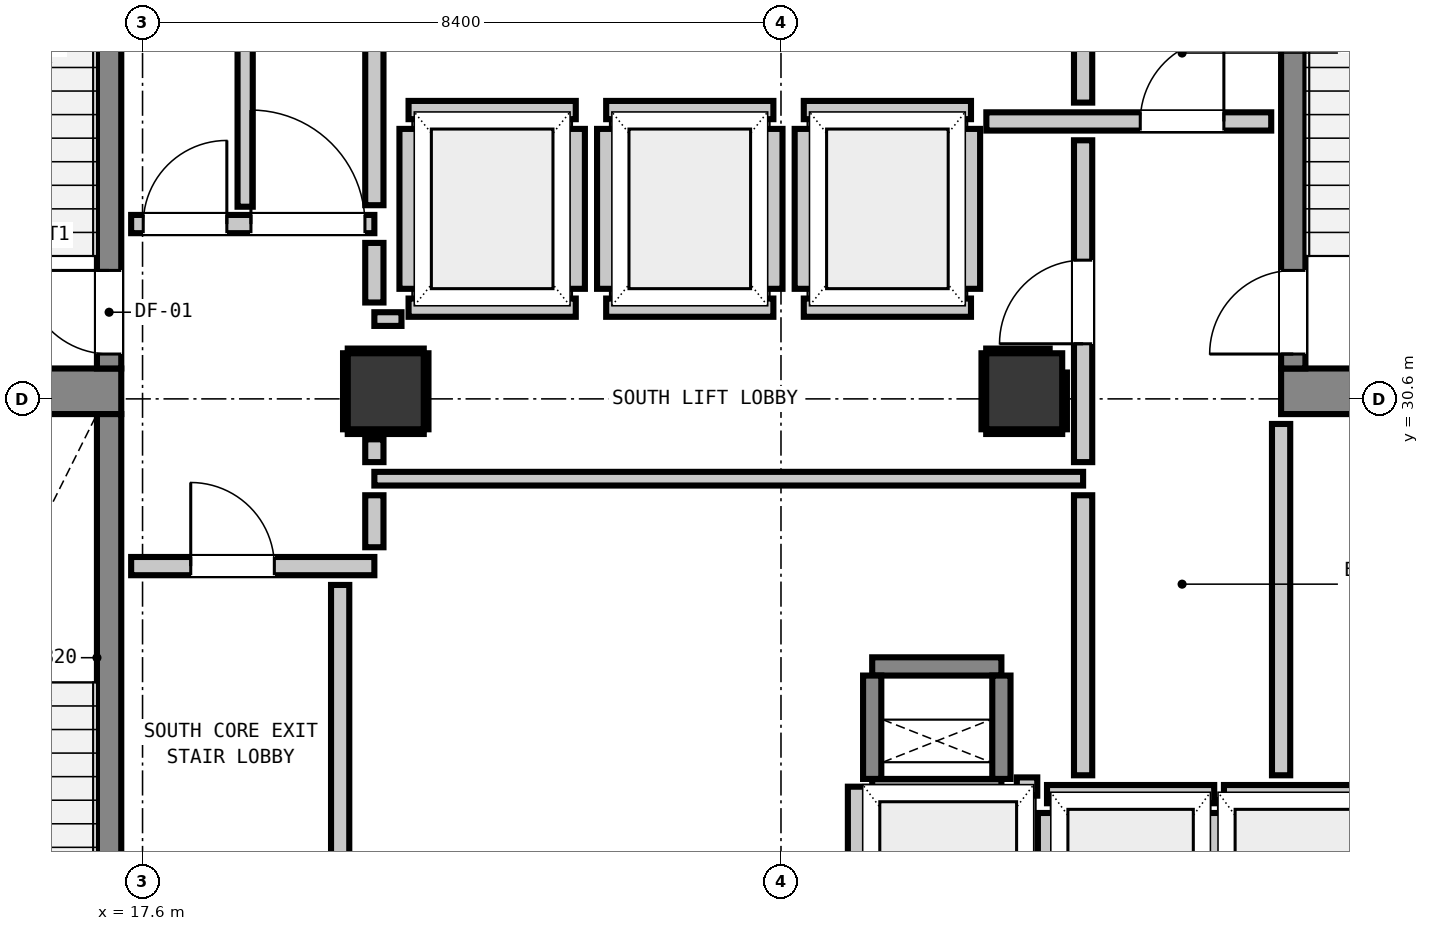
"""IFC4 building model, lengths in metres.
Left out: names, types, materials, properties, quantities, classifications, styles, units other than length and angle.
Written with IfcOpenShell. Run it as: python <this file> out.ifc"""

import sys

from ifc_helpers import new_model, si_unit, direction, frame, frame_2d, origin, origin_2d, place, context, subcontext, project, spatial, rectangle, extrude, element, fill, save


model = new_model("IFC4")
c1 = context("Model", 3, precision=1e-05, world=origin(), true_north=direction((0.0, 1.0)))
c2 = subcontext(c1, "Body", "Model", "MODEL_VIEW")
j1 = project(units=[si_unit("LENGTHUNIT", "METRE"), si_unit("PLANEANGLEUNIT", "RADIAN")], contexts=[c1])
p1 = place(None, origin())
s1 = spatial("IfcSite", under=j1, at=p1, CompositionType="ELEMENT")
p2 = place(p1, origin())
s2 = spatial("IfcBuilding", under=s1, at=p2, CompositionType="ELEMENT")
p3 = place(p2, frame((0.0, 0.0, 119.36)))
s3 = spatial("IfcBuildingStorey", under=s2, at=p3, CompositionType="ELEMENT", Elevation=119.36)
for number, where, z_axis, x_axis in (
    (1, (13.905, 30.7, 0.0), (0.0, 0.0, 1.0), (1.0, 0.0, 0.0)),
    (2, (32.58, 30.7, 0.0), (0.0, 0.0, 1.0), (1.0, 0.0, 0.0)),
):
    element("IfcWall", number, at=place(p3, frame(where, z_axis=z_axis, x_axis=x_axis)), inside=s3, PredefinedType="SHEAR", context=c2, shape_type="SweptSolid", body=[
        extrude(rectangle(XDim=3.415, YDim=0.6, at=frame_2d((1.708, 0.0))), origin(), (0.0, 0.0, 1.0), 3.32),
    ])
p4 = place(p3, frame((17.16, 31.0, 0.0), z_axis=(0.0, 0.0, 1.0), x_axis=(0.0, 1.0, 0.0)))
e3 = element("IfcWall", 3, at=p4, inside=s3, PredefinedType="SHEAR", context=c2, shape_type="SweptSolid", body=[
    extrude(rectangle(XDim=7.8, YDim=0.32, at=frame_2d((3.9, 0.0))), origin(), (0.0, 0.0, 1.0), 3.32),
])
p5 = place(p4, frame((0.19, 0.0, 0.0)))
e4 = element("IfcOpeningElement", 4, at=p5, cuts=e3, PredefinedType="OPENING", context=c2, shape_type="SweptSolid", body=[
    extrude(rectangle(XDim=1.1, YDim=2.15, at=frame_2d((0.55, 1.075))), frame((0.0, 0.17, 0.0), z_axis=(0.0, -1.0, 0.0), x_axis=(1.0, 0.0, 0.0)), (0.0, 0.0, 1.0), 0.34),
])
p6 = place(p3, frame((17.16, 22.5, 0.0), z_axis=(0.0, 0.0, 1.0), x_axis=(0.0, 1.0, 0.0)))
e5 = element("IfcWall", 5, at=p6, inside=s3, PredefinedType="SHEAR", context=c2, shape_type="SweptSolid", body=[
    extrude(rectangle(XDim=7.9, YDim=0.32, at=frame_2d((3.95, 0.0))), origin(), (0.0, 0.0, 1.0), 3.32),
])
p7 = place(p6, frame((0.29, 0.0, 0.0)))
e6 = element("IfcOpeningElement", 6, at=p7, cuts=e5, PredefinedType="OPENING", context=c2, shape_type="SweptSolid", body=[
    extrude(rectangle(XDim=1.1, YDim=2.15, at=frame_2d((0.55, 1.075))), frame((0.0, 0.17, 0.0), z_axis=(0.0, -1.0, 0.0), x_axis=(1.0, 0.0, 0.0)), (0.0, 0.0, 1.0), 0.34),
])
p8 = place(p3, frame((32.74, 31.0, 0.0), z_axis=(0.0, 0.0, 1.0), x_axis=(0.0, 1.0, 0.0)))
e7 = element("IfcWall", 7, at=p8, inside=s3, PredefinedType="SHEAR", context=c2, shape_type="SweptSolid", body=[
    extrude(rectangle(XDim=7.8, YDim=0.32, at=frame_2d((3.9, 0.0))), origin(), (0.0, 0.0, 1.0), 3.32),
])
p9 = place(p8, frame((0.19, 0.0, 0.0)))
e8 = element("IfcOpeningElement", 8, at=p9, cuts=e7, PredefinedType="OPENING", context=c2, shape_type="SweptSolid", body=[
    extrude(rectangle(XDim=1.1, YDim=2.15, at=frame_2d((0.55, 1.075))), frame((0.0, 0.17, 0.0), z_axis=(0.0, -1.0, 0.0), x_axis=(1.0, 0.0, 0.0)), (0.0, 0.0, 1.0), 0.34),
])
for number, where, z_axis, x_axis in (
    (9, (27.2, 25.48, 0.0), (0.0, 0.0, 1.0), (1.0, 0.0, 0.0)),
    (10, (27.2, 27.08, 0.0), (0.0, 0.0, 1.0), (1.0, 0.0, 0.0)),
):
    element("IfcWall", number, at=place(p3, frame(where, z_axis=z_axis, x_axis=x_axis)), inside=s3, PredefinedType="SHEAR", context=c2, shape_type="SweptSolid", body=[
        extrude(rectangle(XDim=1.7, YDim=0.24, at=frame_2d((0.85, 0.0))), origin(), (0.0, 0.0, 1.0), 3.32),
    ])
for number, where, z_axis, x_axis in (
    (11, (27.2, 25.6, 0.0), (0.0, 0.0, 1.0), (0.0, 1.0, 0.0)),
    (12, (28.9, 25.6, 0.0), (0.0, 0.0, 1.0), (0.0, 1.0, 0.0)),
):
    element("IfcWall", number, at=place(p3, frame(where, z_axis=z_axis, x_axis=x_axis)), inside=s3, PredefinedType="SHEAR", context=c2, shape_type="SweptSolid", body=[
        extrude(rectangle(XDim=1.36, YDim=0.24, at=frame_2d((0.68, 0.0))), origin(), (0.0, 0.0, 1.0), 3.32),
    ])
for number, where, z_axis, x_axis in (
    (13, (20.8, 30.7, 0.0), (0.0, 0.0, 1.0), (1.0, 0.0, 0.0)),
    (14, (29.2, 30.7, 0.0), (0.0, 0.0, 1.0), (1.0, 0.0, 0.0)),
):
    element("IfcColumn", number, at=place(p3, frame(where, z_axis=z_axis, x_axis=x_axis)), inside=s3, PredefinedType="COLUMN", context=c2, shape_type="SweptSolid", body=[
        extrude(rectangle(XDim=1.0, YDim=1.0, at=origin_2d()), origin(), (0.0, 0.0, 1.0), 3.32),
    ])
for number, where, z_axis, x_axis in (
    (15, (21.1, 31.8, 0.0), (0.0, 0.0, 1.0), (1.0, 0.0, 0.0)),
    (16, (21.1, 34.4, 0.0), (0.0, 0.0, 1.0), (1.0, 0.0, 0.0)),
):
    element("IfcWall", number, at=place(p3, frame(where, z_axis=z_axis, x_axis=x_axis)), inside=s3, PredefinedType="PARTITIONING", context=c2, shape_type="SweptSolid", body=[
        extrude(rectangle(XDim=2.2, YDim=0.24, at=frame_2d((1.1, 0.0))), origin(), (0.0, 0.0, 1.0), 3.08),
    ])
p10 = place(p3, frame((21.1, 32.048, 0.0), z_axis=(0.0, 0.0, 1.0), x_axis=(0.0, 1.0, 0.0)))
e17 = element("IfcWall", 17, at=p10, inside=s3, PredefinedType="PARTITIONING", context=c2, shape_type="SweptSolid", body=[
    extrude(rectangle(XDim=2.104, YDim=0.24, at=frame_2d((1.052, 0.0))), origin(), (0.0, 0.0, 1.0), 2.315),
])
p11 = place(p3, frame((23.3, 32.048, 0.0), z_axis=(0.0, 0.0, 1.0), x_axis=(0.0, 1.0, 0.0)))
e18 = element("IfcWall", 18, at=p11, inside=s3, PredefinedType="PARTITIONING", context=c2, shape_type="SweptSolid", body=[
    extrude(rectangle(XDim=2.104, YDim=0.24, at=frame_2d((1.052, 0.0))), origin(), (0.0, 0.0, 1.0), 3.08),
])
for number, where, z_axis, x_axis in (
    (19, (23.7, 31.8, 0.0), (0.0, 0.0, 1.0), (1.0, 0.0, 0.0)),
    (20, (23.7, 34.4, 0.0), (0.0, 0.0, 1.0), (1.0, 0.0, 0.0)),
):
    element("IfcWall", number, at=place(p3, frame(where, z_axis=z_axis, x_axis=x_axis)), inside=s3, PredefinedType="PARTITIONING", context=c2, shape_type="SweptSolid", body=[
        extrude(rectangle(XDim=2.2, YDim=0.24, at=frame_2d((1.1, 0.0))), origin(), (0.0, 0.0, 1.0), 3.08),
    ])
for number, where, z_axis, x_axis in (
    (21, (23.7, 32.048, 0.0), (0.0, 0.0, 1.0), (0.0, 1.0, 0.0)),
    (22, (25.9, 32.048, 0.0), (0.0, 0.0, 1.0), (0.0, 1.0, 0.0)),
):
    element("IfcWall", number, at=place(p3, frame(where, z_axis=z_axis, x_axis=x_axis)), inside=s3, PredefinedType="PARTITIONING", context=c2, shape_type="SweptSolid", body=[
        extrude(rectangle(XDim=2.104, YDim=0.24, at=frame_2d((1.052, 0.0))), origin(), (0.0, 0.0, 1.0), 3.08),
    ])
for number, where, z_axis, x_axis in (
    (23, (26.3, 31.8, 0.0), (0.0, 0.0, 1.0), (1.0, 0.0, 0.0)),
    (24, (26.3, 34.4, 0.0), (0.0, 0.0, 1.0), (1.0, 0.0, 0.0)),
):
    element("IfcWall", number, at=place(p3, frame(where, z_axis=z_axis, x_axis=x_axis)), inside=s3, PredefinedType="PARTITIONING", context=c2, shape_type="SweptSolid", body=[
        extrude(rectangle(XDim=2.2, YDim=0.24, at=frame_2d((1.1, 0.0))), origin(), (0.0, 0.0, 1.0), 3.08),
    ])
for number, where, z_axis, x_axis in (
    (25, (26.3, 32.048, 0.0), (0.0, 0.0, 1.0), (0.0, 1.0, 0.0)),
    (26, (28.5, 32.048, 0.0), (0.0, 0.0, 1.0), (0.0, 1.0, 0.0)),
):
    element("IfcWall", number, at=place(p3, frame(where, z_axis=z_axis, x_axis=x_axis)), inside=s3, PredefinedType="PARTITIONING", context=c2, shape_type="SweptSolid", body=[
        extrude(rectangle(XDim=2.104, YDim=0.24, at=frame_2d((1.052, 0.0))), origin(), (0.0, 0.0, 1.0), 3.08),
    ])
p12 = place(p3, frame((29.5, 25.4, 0.0), z_axis=(0.0, 0.0, 1.0), x_axis=(1.0, 0.0, 0.0)))
e27 = element("IfcWall", 27, at=p12, inside=s3, PredefinedType="PARTITIONING", context=c2, shape_type="SweptSolid", body=[
    extrude(rectangle(XDim=2.2, YDim=0.24, at=frame_2d((1.1, 0.0))), origin(), (0.0, 0.0, 1.0), 3.08),
])
p13 = place(p3, frame((29.5, 22.632, 0.0), z_axis=(0.0, 0.0, 1.0), x_axis=(0.0, 1.0, 0.0)))
e28 = element("IfcWall", 28, at=p13, inside=s3, PredefinedType="PARTITIONING", context=c2, shape_type="SweptSolid", body=[
    extrude(rectangle(XDim=2.52, YDim=0.24, at=frame_2d((1.26, 0.0))), origin(), (0.0, 0.0, 1.0), 2.315),
])
p14 = place(p3, frame((31.7, 22.63, 0.0), z_axis=(0.0, 0.0, 1.0), x_axis=(0.0, 1.0, 0.0)))
e29 = element("IfcWall", 29, at=p14, inside=s3, PredefinedType="PARTITIONING", context=c2, shape_type="SweptSolid", body=[
    extrude(rectangle(XDim=2.522, YDim=0.24, at=frame_2d((1.261, 0.0))), origin(), (0.0, 0.0, 1.0), 3.08),
])
p15 = place(p3, frame((31.828, 25.4, 0.0), z_axis=(0.0, 0.0, 1.0), x_axis=(1.0, 0.0, 0.0)))
e30 = element("IfcWall", 30, at=p15, inside=s3, PredefinedType="PARTITIONING", context=c2, shape_type="SweptSolid", body=[
    extrude(rectangle(XDim=2.072, YDim=0.24, at=frame_2d((1.036, 0.0))), origin(), (0.0, 0.0, 1.0), 3.08),
])
p16 = place(p3, frame((29.103, 25.5, 0.0), z_axis=(0.0, 0.0, 1.0), x_axis=(1.0, 0.0, 0.0)))
e31 = element("IfcWall", 31, at=p16, inside=s3, PredefinedType="PARTITIONING", context=c2, shape_type="SweptSolid", body=[
    extrude(rectangle(XDim=0.269, YDim=0.24, at=frame_2d((0.135, 0.0))), origin(), (0.0, 0.0, 1.0), 3.08),
])
p17 = place(p3, frame((27.0, 22.63, 0.0), z_axis=(0.0, 0.0, 1.0), x_axis=(0.0, 1.0, 0.0)))
e32 = element("IfcWall", 32, at=p17, inside=s3, PredefinedType="PARTITIONING", context=c2, shape_type="SweptSolid", body=[
    extrude(rectangle(XDim=2.868, YDim=0.24, at=frame_2d((1.434, 0.0))), origin(), (0.0, 0.0, 1.0), 3.08),
])
p18 = place(p3, frame((17.45, 28.4, 0.0), z_axis=(0.0, 0.0, 1.0), x_axis=(1.0, 0.0, 0.0)))
e33 = element("IfcWall", 33, at=p18, inside=s3, PredefinedType="PARTITIONING", context=c2, shape_type="SweptSolid", body=[
    extrude(rectangle(XDim=3.2, YDim=0.24, at=frame_2d((1.6, 0.0))), origin(), (0.0, 0.0, 1.0), 3.08),
])
p19 = place(p18, frame((0.784, 0.0, 0.0)))
e34 = element("IfcOpeningElement", 34, at=p19, cuts=e33, PredefinedType="OPENING", context=c2, shape_type="SweptSolid", body=[
    extrude(rectangle(XDim=1.1, YDim=2.15, at=frame_2d((0.55, 1.075))), frame((0.0, 0.13, 0.0), z_axis=(0.0, -1.0, 0.0), x_axis=(1.0, 0.0, 0.0)), (0.0, 0.0, 1.0), 0.26),
])
p20 = place(p3, frame((17.45, 32.9, 0.0), z_axis=(0.0, 0.0, 1.0), x_axis=(1.0, 0.0, 0.0)))
e35 = element("IfcWall", 35, at=p20, inside=s3, PredefinedType="PARTITIONING", context=c2, shape_type="SweptSolid", body=[
    extrude(rectangle(XDim=3.2, YDim=0.24, at=frame_2d((1.6, 0.0))), origin(), (0.0, 0.0, 1.0), 3.08),
])
p21 = place(p20, frame((0.159, 0.0, 0.0)))
e36 = element("IfcOpeningElement", 36, at=p21, cuts=e35, PredefinedType="OPENING", context=c2, shape_type="SweptSolid", body=[
    extrude(rectangle(XDim=1.1, YDim=2.15, at=frame_2d((0.55, 1.075))), frame((0.0, 0.13, 0.0), z_axis=(0.0, -1.0, 0.0), x_axis=(1.0, 0.0, 0.0)), (0.0, 0.0, 1.0), 0.26),
])
p22 = place(p20, frame((1.576, 0.0, 0.0)))
e37 = element("IfcOpeningElement", 37, at=p22, cuts=e35, PredefinedType="OPENING", context=c2, shape_type="SweptSolid", body=[
    extrude(rectangle(XDim=1.5, YDim=2.15, at=frame_2d((0.75, 1.075))), frame((0.0, 0.13, 0.0), z_axis=(0.0, -1.0, 0.0), x_axis=(1.0, 0.0, 0.0)), (0.0, 0.0, 1.0), 0.26),
])
p23 = place(p3, frame((28.702, 34.25, 0.0), z_axis=(0.0, 0.0, 1.0), x_axis=(1.0, 0.0, 0.0)))
e38 = element("IfcWall", 38, at=p23, inside=s3, PredefinedType="PARTITIONING", context=c2, shape_type="SweptSolid", body=[
    extrude(rectangle(XDim=3.748, YDim=0.24, at=frame_2d((1.874, 0.0))), origin(), (0.0, 0.0, 1.0), 3.08),
])
p24 = place(p23, frame((2.025, 0.0, 0.0)))
e39 = element("IfcOpeningElement", 39, at=p24, cuts=e38, PredefinedType="OPENING", context=c2, shape_type="SweptSolid", body=[
    extrude(rectangle(XDim=1.1, YDim=2.15, at=frame_2d((0.55, 1.075))), frame((0.0, 0.13, 0.0), z_axis=(0.0, -1.0, 0.0), x_axis=(1.0, 0.0, 0.0)), (0.0, 0.0, 1.0), 0.26),
])
p25 = place(p3, frame((20.65, 29.55, 0.0), z_axis=(0.0, 0.0, 1.0), x_axis=(1.0, 0.0, 0.0)))
e40 = element("IfcWall", 40, at=p25, inside=s3, PredefinedType="PARTITIONING", context=c2, shape_type="SweptSolid", body=[
    extrude(rectangle(XDim=9.325, YDim=0.18, at=frame_2d((4.663, 0.0))), origin(), (0.0, 0.0, 1.0), 3.08),
])
p26 = place(p3, frame((20.65, 31.65, 0.0), z_axis=(0.0, 0.0, 1.0), x_axis=(1.0, 0.0, 0.0)))
e41 = element("IfcWall", 41, at=p26, inside=s3, PredefinedType="PARTITIONING", context=c2, shape_type="SweptSolid", body=[
    extrude(rectangle(XDim=0.357, YDim=0.18, at=frame_2d((0.179, 0.0))), origin(), (0.0, 0.0, 1.0), 3.08),
])
p27 = place(p3, frame((20.2, 22.586, 0.0), z_axis=(0.0, 0.0, 1.0), x_axis=(0.0, 1.0, 0.0)))
e42 = element("IfcWall", 42, at=p27, inside=s3, PredefinedType="PARTITIONING", context=c2, shape_type="SweptSolid", body=[
    extrude(rectangle(XDim=5.566, YDim=0.24, at=frame_2d((2.783, 0.0))), origin(), (0.0, 0.0, 1.0), 3.08),
])
p28 = place(p3, frame((20.65, 28.648, 0.0), z_axis=(0.0, 0.0, 1.0), x_axis=(0.0, 1.0, 0.0)))
e43 = element("IfcWall", 43, at=p28, inside=s3, PredefinedType="PARTITIONING", context=c2, shape_type="SweptSolid", body=[
    extrude(rectangle(XDim=0.684, YDim=0.24, at=frame_2d((0.342, 0.0))), origin(), (0.0, 0.0, 1.0), 2.315),
])
p29 = place(p3, frame((20.65, 29.768, 0.0), z_axis=(0.0, 0.0, 1.0), x_axis=(0.0, 1.0, 0.0)))
e44 = element("IfcWall", 44, at=p29, inside=s3, PredefinedType="PARTITIONING", context=c2, shape_type="SweptSolid", body=[
    extrude(rectangle(XDim=0.3, YDim=0.24, at=frame_2d((0.15, 0.0))), origin(), (0.0, 0.0, 1.0), 2.315),
])
p30 = place(p3, frame((20.65, 31.868, 0.0), z_axis=(0.0, 0.0, 1.0), x_axis=(0.0, 1.0, 0.0)))
e45 = element("IfcWall", 45, at=p30, inside=s3, PredefinedType="PARTITIONING", context=c2, shape_type="SweptSolid", body=[
    extrude(rectangle(XDim=0.784, YDim=0.24, at=frame_2d((0.392, 0.0))), origin(), (0.0, 0.0, 1.0), 2.315),
])
p31 = place(p3, frame((20.65, 33.148, 0.0), z_axis=(0.0, 0.0, 1.0), x_axis=(0.0, 1.0, 0.0)))
e46 = element("IfcWall", 46, at=p31, inside=s3, PredefinedType="PARTITIONING", context=c2, shape_type="SweptSolid", body=[
    extrude(rectangle(XDim=2.274, YDim=0.24, at=frame_2d((1.137, 0.0))), origin(), (0.0, 0.0, 1.0), 2.315),
])
p32 = place(p3, frame((29.975, 25.648, 0.0), z_axis=(0.0, 0.0, 1.0), x_axis=(0.0, 1.0, 0.0)))
e47 = element("IfcWall", 47, at=p32, inside=s3, PredefinedType="PARTITIONING", context=c2, shape_type="SweptSolid", body=[
    extrude(rectangle(XDim=3.684, YDim=0.24, at=frame_2d((1.842, 0.0))), origin(), (0.0, 0.0, 1.0), 3.08),
])
p33 = place(p3, frame((29.975, 29.768, 0.0), z_axis=(0.0, 0.0, 1.0), x_axis=(0.0, 1.0, 0.0)))
e48 = element("IfcWall", 48, at=p33, inside=s3, PredefinedType="PARTITIONING", context=c2, shape_type="SweptSolid", body=[
    extrude(rectangle(XDim=4.234, YDim=0.24, at=frame_2d((2.117, 0.0))), origin(), (0.0, 0.0, 1.0), 3.08),
])
p34 = place(p33, frame((1.557, 0.0, 0.0)))
e49 = element("IfcOpeningElement", 49, at=p34, cuts=e48, PredefinedType="OPENING", context=c2, shape_type="SweptSolid", body=[
    extrude(rectangle(XDim=1.1, YDim=2.15, at=frame_2d((0.55, 1.075))), frame((0.0, 0.13, 0.0), z_axis=(0.0, -1.0, 0.0), x_axis=(1.0, 0.0, 0.0)), (0.0, 0.0, 1.0), 0.26),
])
p35 = place(p3, frame((29.975, 34.498, 0.0), z_axis=(0.0, 0.0, 1.0), x_axis=(0.0, 1.0, 0.0)))
e50 = element("IfcWall", 50, at=p35, inside=s3, PredefinedType="PARTITIONING", context=c2, shape_type="SweptSolid", body=[
    extrude(rectangle(XDim=0.924, YDim=0.24, at=frame_2d((0.462, 0.0))), origin(), (0.0, 0.0, 1.0), 3.08),
])
p36 = place(p3, frame((32.58, 25.648, 0.0), z_axis=(0.0, 0.0, 1.0), x_axis=(0.0, 1.0, 0.0)))
e51 = element("IfcWall", 51, at=p36, inside=s3, PredefinedType="PARTITIONING", context=c2, shape_type="SweptSolid", body=[
    extrude(rectangle(XDim=4.622, YDim=0.24, at=frame_2d((2.311, 0.0))), origin(), (0.0, 0.0, 1.0), 3.08),
])
p37 = place(p3, frame((18.95, 33.128, 0.0), z_axis=(0.0, 0.0, 1.0), x_axis=(0.0, 1.0, 0.0)))
e52 = element("IfcWall", 52, at=p37, inside=s3, PredefinedType="PARTITIONING", context=c2, shape_type="SweptSolid", body=[
    extrude(rectangle(XDim=2.314, YDim=0.2, at=frame_2d((1.157, 0.0))), origin(), (0.0, 0.0, 1.0), 3.08),
])
for number, where, z_axis, x_axis in (
    (53, (20.3, 30.168, 0.0), (0.0, 0.0, 1.0), (1.0, 0.0, 0.0)),
    (54, (20.3, 31.232, 0.0), (0.0, 0.0, 1.0), (1.0, 0.0, 0.0)),
    (55, (20.268, 30.2, 0.0), (0.0, 0.0, 1.0), (0.0, 1.0, 0.0)),
    (56, (21.332, 30.2, 0.0), (0.0, 0.0, 1.0), (0.0, 1.0, 0.0)),
    (57, (28.7, 30.168, 0.0), (0.0, 0.0, 1.0), (1.0, 0.0, 0.0)),
):
    element("IfcWall", number, at=place(p3, frame(where, z_axis=z_axis, x_axis=x_axis)), inside=s3, PredefinedType="PARTITIONING", context=c2, shape_type="SweptSolid", body=[
        extrude(rectangle(XDim=1.0, YDim=0.06, at=frame_2d((0.5, 0.0))), origin(), (0.0, 0.0, 1.0), 1.45),
    ])
p38 = place(p3, frame((28.7, 31.232, 0.0), z_axis=(0.0, 0.0, 1.0), x_axis=(1.0, 0.0, 0.0)))
e58 = element("IfcWall", 58, at=p38, inside=s3, PredefinedType="PARTITIONING", context=c2, shape_type="SweptSolid", body=[
    extrude(rectangle(XDim=0.835, YDim=0.06, at=frame_2d((0.417, 0.0))), origin(), (0.0, 0.0, 1.0), 1.45),
])
p39 = place(p3, frame((28.668, 30.2, 0.0), z_axis=(0.0, 0.0, 1.0), x_axis=(0.0, 1.0, 0.0)))
e59 = element("IfcWall", 59, at=p39, inside=s3, PredefinedType="PARTITIONING", context=c2, shape_type="SweptSolid", body=[
    extrude(rectangle(XDim=1.0, YDim=0.06, at=frame_2d((0.5, 0.0))), origin(), (0.0, 0.0, 1.0), 1.45),
])
p40 = place(p3, frame((29.732, 30.2, 0.0), z_axis=(0.0, 0.0, 1.0), x_axis=(0.0, 1.0, 0.0)))
e60 = element("IfcWall", 60, at=p40, inside=s3, PredefinedType="PARTITIONING", context=c2, shape_type="SweptSolid", body=[
    extrude(rectangle(XDim=0.747, YDim=0.06, at=frame_2d((0.374, 0.0))), origin(), (0.0, 0.0, 1.0), 1.45),
])
p41 = place(p5, origin())
e61 = element("IfcDoor", 61, at=p41, inside=s3, OperationType="SINGLE_SWING_RIGHT", PredefinedType="DOOR", context=c2, shape_type="SweptSolid", body=[
    extrude(rectangle(XDim=1.1, YDim=2.15, at=frame_2d((0.55, 1.075))), frame((0.0, 0.025, 0.0), z_axis=(0.0, -1.0, 0.0), x_axis=(1.0, 0.0, 0.0)), (0.0, 0.0, 1.0), 0.05),
])
fill(e4, e61)
p42 = place(p9, origin())
e62 = element("IfcDoor", 62, at=p42, inside=s3, OperationType="SINGLE_SWING_LEFT", PredefinedType="DOOR", context=c2, shape_type="SweptSolid", body=[
    extrude(rectangle(XDim=1.1, YDim=2.15, at=frame_2d((0.55, 1.075))), frame((0.0, 0.025, 0.0), z_axis=(0.0, -1.0, 0.0), x_axis=(1.0, 0.0, 0.0)), (0.0, 0.0, 1.0), 0.05),
])
fill(e8, e62)
p43 = place(p19, origin())
e63 = element("IfcDoor", 63, at=p43, inside=s3, OperationType="SINGLE_SWING_LEFT", PredefinedType="DOOR", context=c2, shape_type="SweptSolid", body=[
    extrude(rectangle(XDim=1.1, YDim=2.15, at=frame_2d((0.55, 1.075))), frame((0.0, 0.025, 0.0), z_axis=(0.0, -1.0, 0.0), x_axis=(1.0, 0.0, 0.0)), (0.0, 0.0, 1.0), 0.05),
])
fill(e34, e63)
p44 = place(p21, origin())
e64 = element("IfcDoor", 64, at=p44, inside=s3, OperationType="SINGLE_SWING_RIGHT", PredefinedType="DOOR", context=c2, shape_type="SweptSolid", body=[
    extrude(rectangle(XDim=1.1, YDim=2.15, at=frame_2d((0.55, 1.075))), frame((0.0, 0.025, 0.0), z_axis=(0.0, -1.0, 0.0), x_axis=(1.0, 0.0, 0.0)), (0.0, 0.0, 1.0), 0.05),
])
fill(e36, e64)
p45 = place(p34, origin())
e65 = element("IfcDoor", 65, at=p45, inside=s3, OperationType="SINGLE_SWING_LEFT", PredefinedType="DOOR", context=c2, shape_type="SweptSolid", body=[
    extrude(rectangle(XDim=1.1, YDim=2.15, at=frame_2d((0.55, 1.075))), frame((0.0, 0.025, 0.0), z_axis=(0.0, -1.0, 0.0), x_axis=(1.0, 0.0, 0.0)), (0.0, 0.0, 1.0), 0.05),
])
fill(e49, e65)
p46 = place(p24, origin())
e66 = element("IfcDoor", 66, at=p46, inside=s3, OperationType="SINGLE_SWING_RIGHT", PredefinedType="DOOR", context=c2, shape_type="SweptSolid", body=[
    extrude(rectangle(XDim=1.1, YDim=2.15, at=frame_2d((0.55, 1.075))), frame((0.0, 0.025, 0.0), z_axis=(0.0, -1.0, 0.0), x_axis=(1.0, 0.0, 0.0)), (0.0, 0.0, 1.0), 0.05),
])
fill(e39, e66)
p47 = place(p22, origin())
e67 = element("IfcDoor", 67, at=p47, inside=s3, OperationType="SINGLE_SWING_LEFT", PredefinedType="DOOR", context=c2, shape_type="SweptSolid", body=[
    extrude(rectangle(XDim=1.5, YDim=2.15, at=frame_2d((0.75, 1.075))), frame((0.0, 0.025, 0.0), z_axis=(0.0, -1.0, 0.0), x_axis=(1.0, 0.0, 0.0)), (0.0, 0.0, 1.0), 0.05),
])
fill(e37, e67)
save(model, sys.argv[1])
